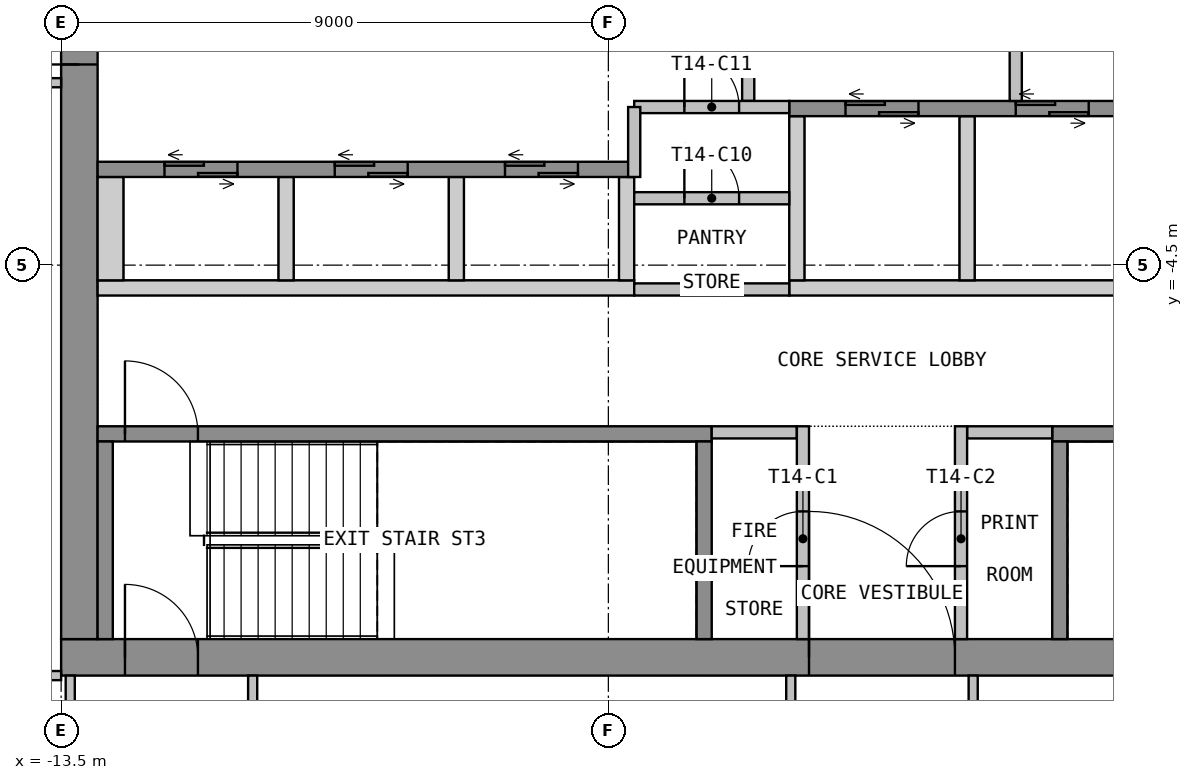
"""IFC4 building model, lengths in metres.
Left out: names, types, materials, properties, quantities, classifications, styles, units other than length and angle.
Written with IfcOpenShell. Run it as: python <this file> out.ifc"""

import sys

from ifc_helpers import new_model, si_unit, direction, frame, frame_2d, origin, place, context, subcontext, project, spatial, polyline, rectangle, outline, extrude, element, fill, save


model = new_model("IFC4")
c1 = context("Model", 3, precision=1e-05, world=origin(), true_north=direction((0.0, 1.0)))
c2 = subcontext(c1, "Body", "Model", "MODEL_VIEW")
j1 = project(units=[si_unit("LENGTHUNIT", "METRE"), si_unit("PLANEANGLEUNIT", "RADIAN")], contexts=[c1])
p1 = place(None, origin())
s1 = spatial("IfcSite", under=j1, at=p1, CompositionType="ELEMENT")
p2 = place(p1, origin())
s2 = spatial("IfcBuilding", under=s1, at=p2, CompositionType="ELEMENT")
p3 = place(p2, frame((0.0, 0.0, 195.6)))
s3 = spatial("IfcBuildingStorey", under=s2, at=p3, CompositionType="ELEMENT", Elevation=195.6)
p4 = place(p3, frame((-13.5, -10.95, 0.0), z_axis=(0.0, 0.0, 1.0), x_axis=(1.0, 0.0, 0.0)))
e1 = element("IfcWall", 1, at=p4, inside=s3, PredefinedType="SHEAR", context=c2, shape_type="SweptSolid", body=[
    extrude(rectangle(XDim=27.0, YDim=0.6, at=frame_2d((13.5, 0.0))), origin(), (0.0, 0.0, 1.0), 3.55),
])
p5 = place(p4, frame((12.3, 0.0, 0.0)))
e2 = element("IfcOpeningElement", 2, at=p5, cuts=e1, PredefinedType="OPENING", context=c2, shape_type="SweptSolid", body=[
    extrude(rectangle(XDim=2.4, YDim=2.1, at=frame_2d((1.2, 1.05))), frame((0.0, 0.31, 0.0), z_axis=(0.0, -1.0, 0.0), x_axis=(1.0, 0.0, 0.0)), (0.0, 0.0, 1.0), 0.62),
])
p6 = place(p4, frame((1.05, 0.0, 0.0)))
e3 = element("IfcOpeningElement", 3, at=p6, cuts=e1, PredefinedType="OPENING", context=c2, shape_type="SweptSolid", body=[
    extrude(rectangle(XDim=1.2, YDim=2.1, at=frame_2d((0.6, 1.05))), frame((0.0, 0.31, 0.0), z_axis=(0.0, -1.0, 0.0), x_axis=(1.0, 0.0, 0.0)), (0.0, 0.0, 1.0), 0.62),
])
p7 = place(p4, frame((24.75, 0.0, 0.0)))
e4 = element("IfcOpeningElement", 4, at=p7, cuts=e1, PredefinedType="OPENING", context=c2, shape_type="SweptSolid", body=[
    extrude(rectangle(XDim=1.2, YDim=2.1, at=frame_2d((0.6, 1.05))), frame((0.0, 0.31, 0.0), z_axis=(0.0, -1.0, 0.0), x_axis=(1.0, 0.0, 0.0)), (0.0, 0.0, 1.0), 0.62),
])
p8 = place(p3, frame((-13.2, -10.65, 0.0), z_axis=(0.0, 0.0, 1.0), x_axis=(0.0, 1.0, 0.0)))
e5 = element("IfcWall", 5, at=p8, inside=s3, PredefinedType="SHEAR", context=c2, shape_type="SweptSolid", body=[
    extrude(rectangle(XDim=21.3, YDim=0.6, at=frame_2d((10.65, 0.0))), origin(), (0.0, 0.0, 1.0), 3.55),
])
p9 = place(p8, frame((9.45, 0.0, 0.0)))
e6 = element("IfcOpeningElement", 6, at=p9, cuts=e5, PredefinedType="OPENING", context=c2, shape_type="SweptSolid", body=[
    extrude(rectangle(XDim=2.4, YDim=2.1, at=frame_2d((1.2, 1.05))), frame((0.0, 0.31, 0.0), z_axis=(0.0, -1.0, 0.0), x_axis=(1.0, 0.0, 0.0)), (0.0, 0.0, 1.0), 0.62),
])
p10 = place(p3, origin())
e7 = element("IfcWall", 7, at=p10, inside=s3, PredefinedType="SHEAR", context=c2, shape_type="SweptSolid", body=[
    extrude(outline(polyline([(-12.9, -5.0), (-4.075, -5.0), (-4.075, -4.75), (-12.9, -4.75), (-12.9, -5.0)])), origin(), (0.0, 0.0, 1.0), 3.55),
])
p11 = place(p3, origin())
e8 = element("IfcWall", 8, at=p11, inside=s3, PredefinedType="SHEAR", context=c2, shape_type="SweptSolid", body=[
    extrude(outline(polyline([(-1.525, -5.0), (12.9, -5.0), (12.9, -4.75), (-1.525, -4.75), (-1.525, -5.0)])), origin(), (0.0, 0.0, 1.0), 3.55),
])
p12 = place(p3, origin())
e9 = element("IfcWall", 9, at=p12, inside=s3, PredefinedType="SHEAR", context=c2, shape_type="SweptSolid", body=[
    extrude(outline(polyline([(-12.9, -4.75), (-12.475, -4.75), (-12.475, -3.05), (-12.9, -3.05), (-12.9, -4.75)])), origin(), (0.0, 0.0, 1.0), 3.55),
])
p13 = place(p3, origin())
e10 = element("IfcWall", 10, at=p13, inside=s3, PredefinedType="SHEAR", context=c2, shape_type="SweptSolid", body=[
    extrude(outline(polyline([(-9.925, -4.75), (-9.675, -4.75), (-9.675, -3.05), (-9.925, -3.05), (-9.925, -4.75)])), origin(), (0.0, 0.0, 1.0), 3.55),
])
p14 = place(p3, origin())
e11 = element("IfcWall", 11, at=p14, inside=s3, PredefinedType="SHEAR", context=c2, shape_type="SweptSolid", body=[
    extrude(outline(polyline([(-7.125, -4.75), (-6.875, -4.75), (-6.875, -3.05), (-7.125, -3.05), (-7.125, -4.75)])), origin(), (0.0, 0.0, 1.0), 3.55),
])
p15 = place(p3, origin())
e12 = element("IfcWall", 12, at=p15, inside=s3, PredefinedType="SHEAR", context=c2, shape_type="SweptSolid", body=[
    extrude(outline(polyline([(-4.325, -4.75), (-4.075, -4.75), (-4.075, -3.05), (-4.325, -3.05), (-4.325, -4.75)])), origin(), (0.0, 0.0, 1.0), 3.55),
])
p16 = place(p3, origin())
e13 = element("IfcWall", 13, at=p16, inside=s3, PredefinedType="SHEAR", context=c2, shape_type="SweptSolid", body=[
    extrude(outline(polyline([(-1.525, -4.75), (-1.275, -4.75), (-1.275, -2.05), (-1.525, -2.05), (-1.525, -4.75)])), origin(), (0.0, 0.0, 1.0), 3.55),
])
p17 = place(p3, origin())
e14 = element("IfcWall", 14, at=p17, inside=s3, PredefinedType="SHEAR", context=c2, shape_type="SweptSolid", body=[
    extrude(outline(polyline([(1.275, -4.75), (1.525, -4.75), (1.525, -2.05), (1.275, -2.05), (1.275, -4.75)])), origin(), (0.0, 0.0, 1.0), 3.55),
])
p18 = place(p3, frame((-12.9, -2.925, 0.0), z_axis=(0.0, 0.0, 1.0), x_axis=(1.0, 0.0, 0.0)))
e15 = element("IfcWall", 15, at=p18, inside=s3, PredefinedType="SHEAR", context=c2, shape_type="SweptSolid", body=[
    extrude(rectangle(XDim=8.825, YDim=0.25, at=frame_2d((4.413, 0.0))), origin(), (0.0, 0.0, 1.0), 3.55),
])
p19 = place(p18, frame((1.1, 0.0, 0.0)))
e16 = element("IfcOpeningElement", 16, at=p19, cuts=e15, PredefinedType="OPENING", context=c2, shape_type="SweptSolid", body=[
    extrude(rectangle(XDim=1.2, YDim=2.1, at=frame_2d((0.6, 1.05))), frame((0.0, 0.135, 0.0), z_axis=(0.0, -1.0, 0.0), x_axis=(1.0, 0.0, 0.0)), (0.0, 0.0, 1.0), 0.27),
])
p20 = place(p18, frame((3.9, 0.0, 0.0)))
e17 = element("IfcOpeningElement", 17, at=p20, cuts=e15, PredefinedType="OPENING", context=c2, shape_type="SweptSolid", body=[
    extrude(rectangle(XDim=1.2, YDim=2.1, at=frame_2d((0.6, 1.05))), frame((0.0, 0.135, 0.0), z_axis=(0.0, -1.0, 0.0), x_axis=(1.0, 0.0, 0.0)), (0.0, 0.0, 1.0), 0.27),
])
p21 = place(p18, frame((6.7, 0.0, 0.0)))
e18 = element("IfcOpeningElement", 18, at=p21, cuts=e15, PredefinedType="OPENING", context=c2, shape_type="SweptSolid", body=[
    extrude(rectangle(XDim=1.2, YDim=2.1, at=frame_2d((0.6, 1.05))), frame((0.0, 0.135, 0.0), z_axis=(0.0, -1.0, 0.0), x_axis=(1.0, 0.0, 0.0)), (0.0, 0.0, 1.0), 0.27),
])
p22 = place(p3, frame((-1.525, -1.925, 0.0), z_axis=(0.0, 0.0, 1.0), x_axis=(1.0, 0.0, 0.0)))
e19 = element("IfcWall", 19, at=p22, inside=s3, PredefinedType="SHEAR", context=c2, shape_type="SweptSolid", body=[
    extrude(rectangle(XDim=14.425, YDim=0.25, at=frame_2d((7.212, 0.0))), origin(), (0.0, 0.0, 1.0), 3.55),
])
p23 = place(p22, frame((0.925, 0.0, 0.0)))
e20 = element("IfcOpeningElement", 20, at=p23, cuts=e19, PredefinedType="OPENING", context=c2, shape_type="SweptSolid", body=[
    extrude(rectangle(XDim=1.2, YDim=2.1, at=frame_2d((0.6, 1.05))), frame((0.0, 0.135, 0.0), z_axis=(0.0, -1.0, 0.0), x_axis=(1.0, 0.0, 0.0)), (0.0, 0.0, 1.0), 0.27),
])
p24 = place(p22, frame((3.725, 0.0, 0.0)))
e21 = element("IfcOpeningElement", 21, at=p24, cuts=e19, PredefinedType="OPENING", context=c2, shape_type="SweptSolid", body=[
    extrude(rectangle(XDim=1.2, YDim=2.1, at=frame_2d((0.6, 1.05))), frame((0.0, 0.135, 0.0), z_axis=(0.0, -1.0, 0.0), x_axis=(1.0, 0.0, 0.0)), (0.0, 0.0, 1.0), 0.27),
])
p25 = place(p3, frame((-2.2, -1.8, 0.0), z_axis=(0.0, 0.0, 1.0), x_axis=(0.0, 1.0, 0.0)))
e22 = element("IfcWall", 22, at=p25, inside=s3, PredefinedType="PARTITIONING", context=c2, shape_type="SweptSolid", body=[
    extrude(rectangle(XDim=3.6, YDim=0.2, at=frame_2d((1.8, 0.0))), origin(), (0.0, 0.0, 1.0), 3.55),
])
p26 = place(p25, frame((1.2, 0.0, 0.0)))
e23 = element("IfcOpeningElement", 23, at=p26, cuts=e22, PredefinedType="OPENING", context=c2, shape_type="SweptSolid", body=[
    extrude(rectangle(XDim=1.2, YDim=2.1, at=frame_2d((0.6, 1.05))), frame((0.0, 0.11, 0.0), z_axis=(0.0, -1.0, 0.0), x_axis=(1.0, 0.0, 0.0)), (0.0, 0.0, 1.0), 0.22),
])
p27 = place(p3, frame((2.2, -1.8, 0.0), z_axis=(0.0, 0.0, 1.0), x_axis=(0.0, 1.0, 0.0)))
e24 = element("IfcWall", 24, at=p27, inside=s3, PredefinedType="PARTITIONING", context=c2, shape_type="SweptSolid", body=[
    extrude(rectangle(XDim=3.6, YDim=0.2, at=frame_2d((1.8, 0.0))), origin(), (0.0, 0.0, 1.0), 3.55),
])
p28 = place(p27, frame((1.2, 0.0, 0.0)))
e25 = element("IfcOpeningElement", 25, at=p28, cuts=e24, PredefinedType="OPENING", context=c2, shape_type="SweptSolid", body=[
    extrude(rectangle(XDim=1.2, YDim=2.1, at=frame_2d((0.6, 1.05))), frame((0.0, 0.11, 0.0), z_axis=(0.0, -1.0, 0.0), x_axis=(1.0, 0.0, 0.0)), (0.0, 0.0, 1.0), 0.22),
])
p29 = place(p3, frame((-12.9, -7.275, 0.0), z_axis=(0.0, 0.0, 1.0), x_axis=(1.0, 0.0, 0.0)))
e26 = element("IfcWall", 26, at=p29, inside=s3, PredefinedType="SHEAR", context=c2, shape_type="SweptSolid", body=[
    extrude(rectangle(XDim=10.1, YDim=0.25, at=frame_2d((5.05, 0.0))), origin(), (0.0, 0.0, 1.0), 3.55),
])
p30 = place(p29, frame((0.45, 0.0, 0.0)))
e27 = element("IfcOpeningElement", 27, at=p30, cuts=e26, PredefinedType="OPENING", context=c2, shape_type="SweptSolid", body=[
    extrude(rectangle(XDim=1.2, YDim=2.1, at=frame_2d((0.6, 1.05))), frame((0.0, 0.135, 0.0), z_axis=(0.0, -1.0, 0.0), x_axis=(1.0, 0.0, 0.0)), (0.0, 0.0, 1.0), 0.27),
])
for number, where, z_axis, x_axis in (
    (28, (-12.775, -10.65, 0.0), (0.0, 0.0, 1.0), (0.0, 1.0, 0.0)),
    (29, (-2.925, -10.65, 0.0), (0.0, 0.0, 1.0), (0.0, 1.0, 0.0)),
):
    element("IfcWall", number, at=place(p3, frame(where, z_axis=z_axis, x_axis=x_axis)), inside=s3, PredefinedType="SHEAR", context=c2, shape_type="SweptSolid", body=[
        extrude(rectangle(XDim=3.25, YDim=0.25, at=frame_2d((1.625, 0.0))), origin(), (0.0, 0.0, 1.0), 3.55),
    ])
p31 = place(p3, frame((2.8, -7.275, 0.0), z_axis=(0.0, 0.0, 1.0), x_axis=(1.0, 0.0, 0.0)))
e30 = element("IfcWall", 30, at=p31, inside=s3, PredefinedType="SHEAR", context=c2, shape_type="SweptSolid", body=[
    extrude(rectangle(XDim=10.1, YDim=0.25, at=frame_2d((5.05, 0.0))), origin(), (0.0, 0.0, 1.0), 3.55),
])
p32 = place(p31, frame((8.45, 0.0, 0.0)))
e31 = element("IfcOpeningElement", 31, at=p32, cuts=e30, PredefinedType="OPENING", context=c2, shape_type="SweptSolid", body=[
    extrude(rectangle(XDim=1.2, YDim=2.1, at=frame_2d((0.6, 1.05))), frame((0.0, 0.135, 0.0), z_axis=(0.0, -1.0, 0.0), x_axis=(1.0, 0.0, 0.0)), (0.0, 0.0, 1.0), 0.27),
])
p33 = place(p3, frame((2.925, -10.65, 0.0), z_axis=(0.0, 0.0, 1.0), x_axis=(0.0, 1.0, 0.0)))
e32 = element("IfcWall", 32, at=p33, inside=s3, PredefinedType="SHEAR", context=c2, shape_type="SweptSolid", body=[
    extrude(rectangle(XDim=3.25, YDim=0.25, at=frame_2d((1.625, 0.0))), origin(), (0.0, 0.0, 1.0), 3.55),
])
for number, where, z_axis, x_axis in (
    (33, (-2.8, -7.25, 0.0), (0.0, 0.0, 1.0), (1.0, 0.0, 0.0)),
    (34, (1.4, -7.25, 0.0), (0.0, 0.0, 1.0), (1.0, 0.0, 0.0)),
):
    element("IfcWall", number, at=place(p3, frame(where, z_axis=z_axis, x_axis=x_axis)), inside=s3, PredefinedType="PARTITIONING", context=c2, shape_type="SweptSolid", body=[
        extrude(rectangle(XDim=1.4, YDim=0.2, at=frame_2d((0.7, 0.0))), origin(), (0.0, 0.0, 1.0), 3.55),
    ])
p34 = place(p3, frame((-1.3, -10.65, 0.0), z_axis=(0.0, 0.0, 1.0), x_axis=(0.0, 1.0, 0.0)))
e35 = element("IfcWall", 35, at=p34, inside=s3, PredefinedType="PARTITIONING", context=c2, shape_type="SweptSolid", body=[
    extrude(rectangle(XDim=3.5, YDim=0.2, at=frame_2d((1.75, 0.0))), origin(), (0.0, 0.0, 1.0), 3.55),
])
p35 = place(p34, frame((1.2, 0.0, 0.0)))
e36 = element("IfcOpeningElement", 36, at=p35, cuts=e35, PredefinedType="OPENING", context=c2, shape_type="SweptSolid", body=[
    extrude(rectangle(XDim=0.9, YDim=2.1, at=frame_2d((0.45, 1.05))), frame((0.0, 0.11, 0.0), z_axis=(0.0, -1.0, 0.0), x_axis=(1.0, 0.0, 0.0)), (0.0, 0.0, 1.0), 0.22),
])
p36 = place(p3, frame((1.3, -10.65, 0.0), z_axis=(0.0, 0.0, 1.0), x_axis=(0.0, 1.0, 0.0)))
e37 = element("IfcWall", 37, at=p36, inside=s3, PredefinedType="PARTITIONING", context=c2, shape_type="SweptSolid", body=[
    extrude(rectangle(XDim=3.5, YDim=0.2, at=frame_2d((1.75, 0.0))), origin(), (0.0, 0.0, 1.0), 3.55),
])
p37 = place(p36, frame((1.2, 0.0, 0.0)))
e38 = element("IfcOpeningElement", 38, at=p37, cuts=e37, PredefinedType="OPENING", context=c2, shape_type="SweptSolid", body=[
    extrude(rectangle(XDim=0.9, YDim=2.1, at=frame_2d((0.45, 1.05))), frame((0.0, 0.11, 0.0), z_axis=(0.0, -1.0, 0.0), x_axis=(1.0, 0.0, 0.0)), (0.0, 0.0, 1.0), 0.22),
])
p38 = place(p3, frame((-4.075, -3.4, 0.0), z_axis=(0.0, 0.0, 1.0), x_axis=(1.0, 0.0, 0.0)))
e39 = element("IfcWall", 39, at=p38, inside=s3, PredefinedType="PARTITIONING", context=c2, shape_type="SweptSolid", body=[
    extrude(rectangle(XDim=2.55, YDim=0.2, at=frame_2d((1.275, 0.0))), origin(), (0.0, 0.0, 1.0), 3.55),
])
p39 = place(p38, frame((0.825, 0.0, 0.0)))
e40 = element("IfcOpeningElement", 40, at=p39, cuts=e39, PredefinedType="OPENING", context=c2, shape_type="SweptSolid", body=[
    extrude(rectangle(XDim=0.9, YDim=2.1, at=frame_2d((0.45, 1.05))), frame((0.0, 0.11, 0.0), z_axis=(0.0, -1.0, 0.0), x_axis=(1.0, 0.0, 0.0)), (0.0, 0.0, 1.0), 0.22),
])
p40 = place(p3, frame((-4.075, -1.9, 0.0), z_axis=(0.0, 0.0, 1.0), x_axis=(1.0, 0.0, 0.0)))
e41 = element("IfcWall", 41, at=p40, inside=s3, PredefinedType="PARTITIONING", context=c2, shape_type="SweptSolid", body=[
    extrude(rectangle(XDim=2.55, YDim=0.2, at=frame_2d((1.275, 0.0))), origin(), (0.0, 0.0, 1.0), 3.55),
])
p41 = place(p40, frame((0.825, 0.0, 0.0)))
e42 = element("IfcOpeningElement", 42, at=p41, cuts=e41, PredefinedType="OPENING", context=c2, shape_type="SweptSolid", body=[
    extrude(rectangle(XDim=0.9, YDim=2.1, at=frame_2d((0.45, 1.05))), frame((0.0, 0.11, 0.0), z_axis=(0.0, -1.0, 0.0), x_axis=(1.0, 0.0, 0.0)), (0.0, 0.0, 1.0), 0.22),
])
p42 = place(p3, frame((-4.075, -4.9, 0.0), z_axis=(0.0, 0.0, 1.0), x_axis=(1.0, 0.0, 0.0)))
e43 = element("IfcWall", 43, at=p42, inside=s3, PredefinedType="PARTITIONING", context=c2, shape_type="SweptSolid", body=[
    extrude(rectangle(XDim=2.55, YDim=0.2, at=frame_2d((1.275, 0.0))), origin(), (0.0, 0.0, 1.0), 3.55),
])
p43 = place(p3, frame((-4.075, -1.9, 0.0), z_axis=(0.0, 0.0, 1.0), x_axis=(0.0, -1.0, 0.0)))
e44 = element("IfcWall", 44, at=p43, inside=s3, PredefinedType="PARTITIONING", context=c2, shape_type="SweptSolid", body=[
    extrude(rectangle(XDim=1.15, YDim=0.2, at=frame_2d((0.575, 0.0))), origin(), (0.0, 0.0, 1.0), 3.55),
])
for number, where, z_axis, x_axis in (
    (45, (-13.5, -11.25, 0.0), (0.0, 0.0, 1.0), (-1.0, 0.0, 0.0)),
    (46, (-17.925, -1.5, 0.0), (0.0, 0.0, 1.0), (1.0, 0.0, 0.0)),
    (47, (-13.35, -11.25, 0.0), (0.0, 0.0, 1.0), (0.0, -1.0, 0.0)),
):
    element("IfcWall", number, at=place(p3, frame(where, z_axis=z_axis, x_axis=x_axis)), inside=s3, PredefinedType="PARTITIONING", context=c2, shape_type="SweptSolid", body=[
        extrude(rectangle(XDim=4.425, YDim=0.15, at=frame_2d((2.212, 0.0))), origin(), (0.0, 0.0, 1.0), 3.55),
    ])
p44 = place(p3, frame((-10.35, -15.825, 0.0), z_axis=(0.0, 0.0, 1.0), x_axis=(0.0, 1.0, 0.0)))
e48 = element("IfcWall", 48, at=p44, inside=s3, PredefinedType="PARTITIONING", context=c2, shape_type="SweptSolid", body=[
    extrude(rectangle(XDim=4.575, YDim=0.15, at=frame_2d((2.288, 0.0))), origin(), (0.0, 0.0, 1.0), 3.55),
])
p45 = place(p3, frame((-1.5, -11.25, 0.0), z_axis=(0.0, 0.0, 1.0), x_axis=(0.0, -1.0, 0.0)))
e49 = element("IfcWall", 49, at=p45, inside=s3, PredefinedType="PARTITIONING", context=c2, shape_type="SweptSolid", body=[
    extrude(rectangle(XDim=4.425, YDim=0.15, at=frame_2d((2.212, 0.0))), origin(), (0.0, 0.0, 1.0), 3.55),
])
p46 = place(p3, frame((1.5, -15.825, 0.0), z_axis=(0.0, 0.0, 1.0), x_axis=(0.0, 1.0, 0.0)))
e50 = element("IfcWall", 50, at=p46, inside=s3, PredefinedType="PARTITIONING", context=c2, shape_type="SweptSolid", body=[
    extrude(rectangle(XDim=4.575, YDim=0.15, at=frame_2d((2.288, 0.0))), origin(), (0.0, 0.0, 1.0), 3.55),
])
p47 = place(p9, origin())
e51 = element("IfcDoor", 51, at=p47, inside=s3, OperationType="DOUBLE_DOOR_DOUBLE_SWING", PredefinedType="DOOR", context=c2, shape_type="SweptSolid", body=[
    extrude(rectangle(XDim=2.4, YDim=2.1, at=frame_2d((1.2, 1.05))), frame((0.0, 0.025, 0.0), z_axis=(0.0, -1.0, 0.0), x_axis=(1.0, 0.0, 0.0)), (0.0, 0.0, 1.0), 0.05),
])
fill(e6, e51)
p48 = place(p5, origin())
e52 = element("IfcDoor", 52, at=p48, inside=s3, OperationType="DOUBLE_DOOR_DOUBLE_SWING", PredefinedType="DOOR", context=c2, shape_type="SweptSolid", body=[
    extrude(rectangle(XDim=2.4, YDim=2.1, at=frame_2d((1.2, 1.05))), frame((0.0, 0.025, 0.0), z_axis=(0.0, -1.0, 0.0), x_axis=(1.0, 0.0, 0.0)), (0.0, 0.0, 1.0), 0.05),
])
fill(e2, e52)
p49 = place(p6, origin())
e53 = element("IfcDoor", 53, at=p49, inside=s3, OperationType="SINGLE_SWING_RIGHT", PredefinedType="DOOR", context=c2, shape_type="SweptSolid", body=[
    extrude(rectangle(XDim=1.2, YDim=2.1, at=frame_2d((0.6, 1.05))), frame((0.0, 0.025, 0.0), z_axis=(0.0, -1.0, 0.0), x_axis=(1.0, 0.0, 0.0)), (0.0, 0.0, 1.0), 0.05),
])
fill(e3, e53)
p50 = place(p19, origin())
e54 = element("IfcDoor", 54, at=p50, inside=s3, OperationType="DOUBLE_DOOR_SLIDING", PredefinedType="DOOR", context=c2, shape_type="SweptSolid", body=[
    extrude(rectangle(XDim=1.2, YDim=2.1, at=frame_2d((0.6, 1.05))), frame((0.0, 0.025, 0.0), z_axis=(0.0, -1.0, 0.0), x_axis=(1.0, 0.0, 0.0)), (0.0, 0.0, 1.0), 0.05),
])
fill(e16, e54)
p51 = place(p20, origin())
e55 = element("IfcDoor", 55, at=p51, inside=s3, OperationType="DOUBLE_DOOR_SLIDING", PredefinedType="DOOR", context=c2, shape_type="SweptSolid", body=[
    extrude(rectangle(XDim=1.2, YDim=2.1, at=frame_2d((0.6, 1.05))), frame((0.0, 0.025, 0.0), z_axis=(0.0, -1.0, 0.0), x_axis=(1.0, 0.0, 0.0)), (0.0, 0.0, 1.0), 0.05),
])
fill(e17, e55)
p52 = place(p21, origin())
e56 = element("IfcDoor", 56, at=p52, inside=s3, OperationType="DOUBLE_DOOR_SLIDING", PredefinedType="DOOR", context=c2, shape_type="SweptSolid", body=[
    extrude(rectangle(XDim=1.2, YDim=2.1, at=frame_2d((0.6, 1.05))), frame((0.0, 0.025, 0.0), z_axis=(0.0, -1.0, 0.0), x_axis=(1.0, 0.0, 0.0)), (0.0, 0.0, 1.0), 0.05),
])
fill(e18, e56)
p53 = place(p23, origin())
e57 = element("IfcDoor", 57, at=p53, inside=s3, OperationType="DOUBLE_DOOR_SLIDING", PredefinedType="DOOR", context=c2, shape_type="SweptSolid", body=[
    extrude(rectangle(XDim=1.2, YDim=2.1, at=frame_2d((0.6, 1.05))), frame((0.0, 0.025, 0.0), z_axis=(0.0, -1.0, 0.0), x_axis=(1.0, 0.0, 0.0)), (0.0, 0.0, 1.0), 0.05),
])
fill(e20, e57)
p54 = place(p24, origin())
e58 = element("IfcDoor", 58, at=p54, inside=s3, OperationType="DOUBLE_DOOR_SLIDING", PredefinedType="DOOR", context=c2, shape_type="SweptSolid", body=[
    extrude(rectangle(XDim=1.2, YDim=2.1, at=frame_2d((0.6, 1.05))), frame((0.0, 0.025, 0.0), z_axis=(0.0, -1.0, 0.0), x_axis=(1.0, 0.0, 0.0)), (0.0, 0.0, 1.0), 0.05),
])
fill(e21, e58)
p55 = place(p30, origin())
e59 = element("IfcDoor", 59, at=p55, inside=s3, OperationType="SINGLE_SWING_LEFT", PredefinedType="DOOR", context=c2, shape_type="SweptSolid", body=[
    extrude(rectangle(XDim=1.2, YDim=2.1, at=frame_2d((0.6, 1.05))), frame((0.0, 0.025, 0.0), z_axis=(0.0, -1.0, 0.0), x_axis=(1.0, 0.0, 0.0)), (0.0, 0.0, 1.0), 0.05),
])
fill(e27, e59)
p56 = place(p35, origin())
e60 = element("IfcDoor", 60, at=p56, inside=s3, OperationType="SINGLE_SWING_LEFT", PredefinedType="DOOR", context=c2, shape_type="SweptSolid", body=[
    extrude(rectangle(XDim=0.9, YDim=2.1, at=frame_2d((0.45, 1.05))), frame((0.0, 0.025, 0.0), z_axis=(0.0, -1.0, 0.0), x_axis=(1.0, 0.0, 0.0)), (0.0, 0.0, 1.0), 0.05),
])
fill(e36, e60)
p57 = place(p37, origin())
e61 = element("IfcDoor", 61, at=p57, inside=s3, OperationType="SINGLE_SWING_LEFT", PredefinedType="DOOR", context=c2, shape_type="SweptSolid", body=[
    extrude(rectangle(XDim=0.9, YDim=2.1, at=frame_2d((0.45, 1.05))), frame((0.0, 0.025, 0.0), z_axis=(0.0, -1.0, 0.0), x_axis=(1.0, 0.0, 0.0)), (0.0, 0.0, 1.0), 0.05),
])
fill(e38, e61)
p58 = place(p39, origin())
e62 = element("IfcDoor", 62, at=p58, inside=s3, OperationType="SINGLE_SWING_LEFT", PredefinedType="DOOR", context=c2, shape_type="SweptSolid", body=[
    extrude(rectangle(XDim=0.9, YDim=2.1, at=frame_2d((0.45, 1.05))), frame((0.0, 0.025, 0.0), z_axis=(0.0, -1.0, 0.0), x_axis=(1.0, 0.0, 0.0)), (0.0, 0.0, 1.0), 0.05),
])
fill(e40, e62)
p59 = place(p41, origin())
e63 = element("IfcDoor", 63, at=p59, inside=s3, OperationType="SINGLE_SWING_LEFT", PredefinedType="DOOR", context=c2, shape_type="SweptSolid", body=[
    extrude(rectangle(XDim=0.9, YDim=2.1, at=frame_2d((0.45, 1.05))), frame((0.0, 0.025, 0.0), z_axis=(0.0, -1.0, 0.0), x_axis=(1.0, 0.0, 0.0)), (0.0, 0.0, 1.0), 0.05),
])
fill(e42, e63)
save(model, sys.argv[1])
